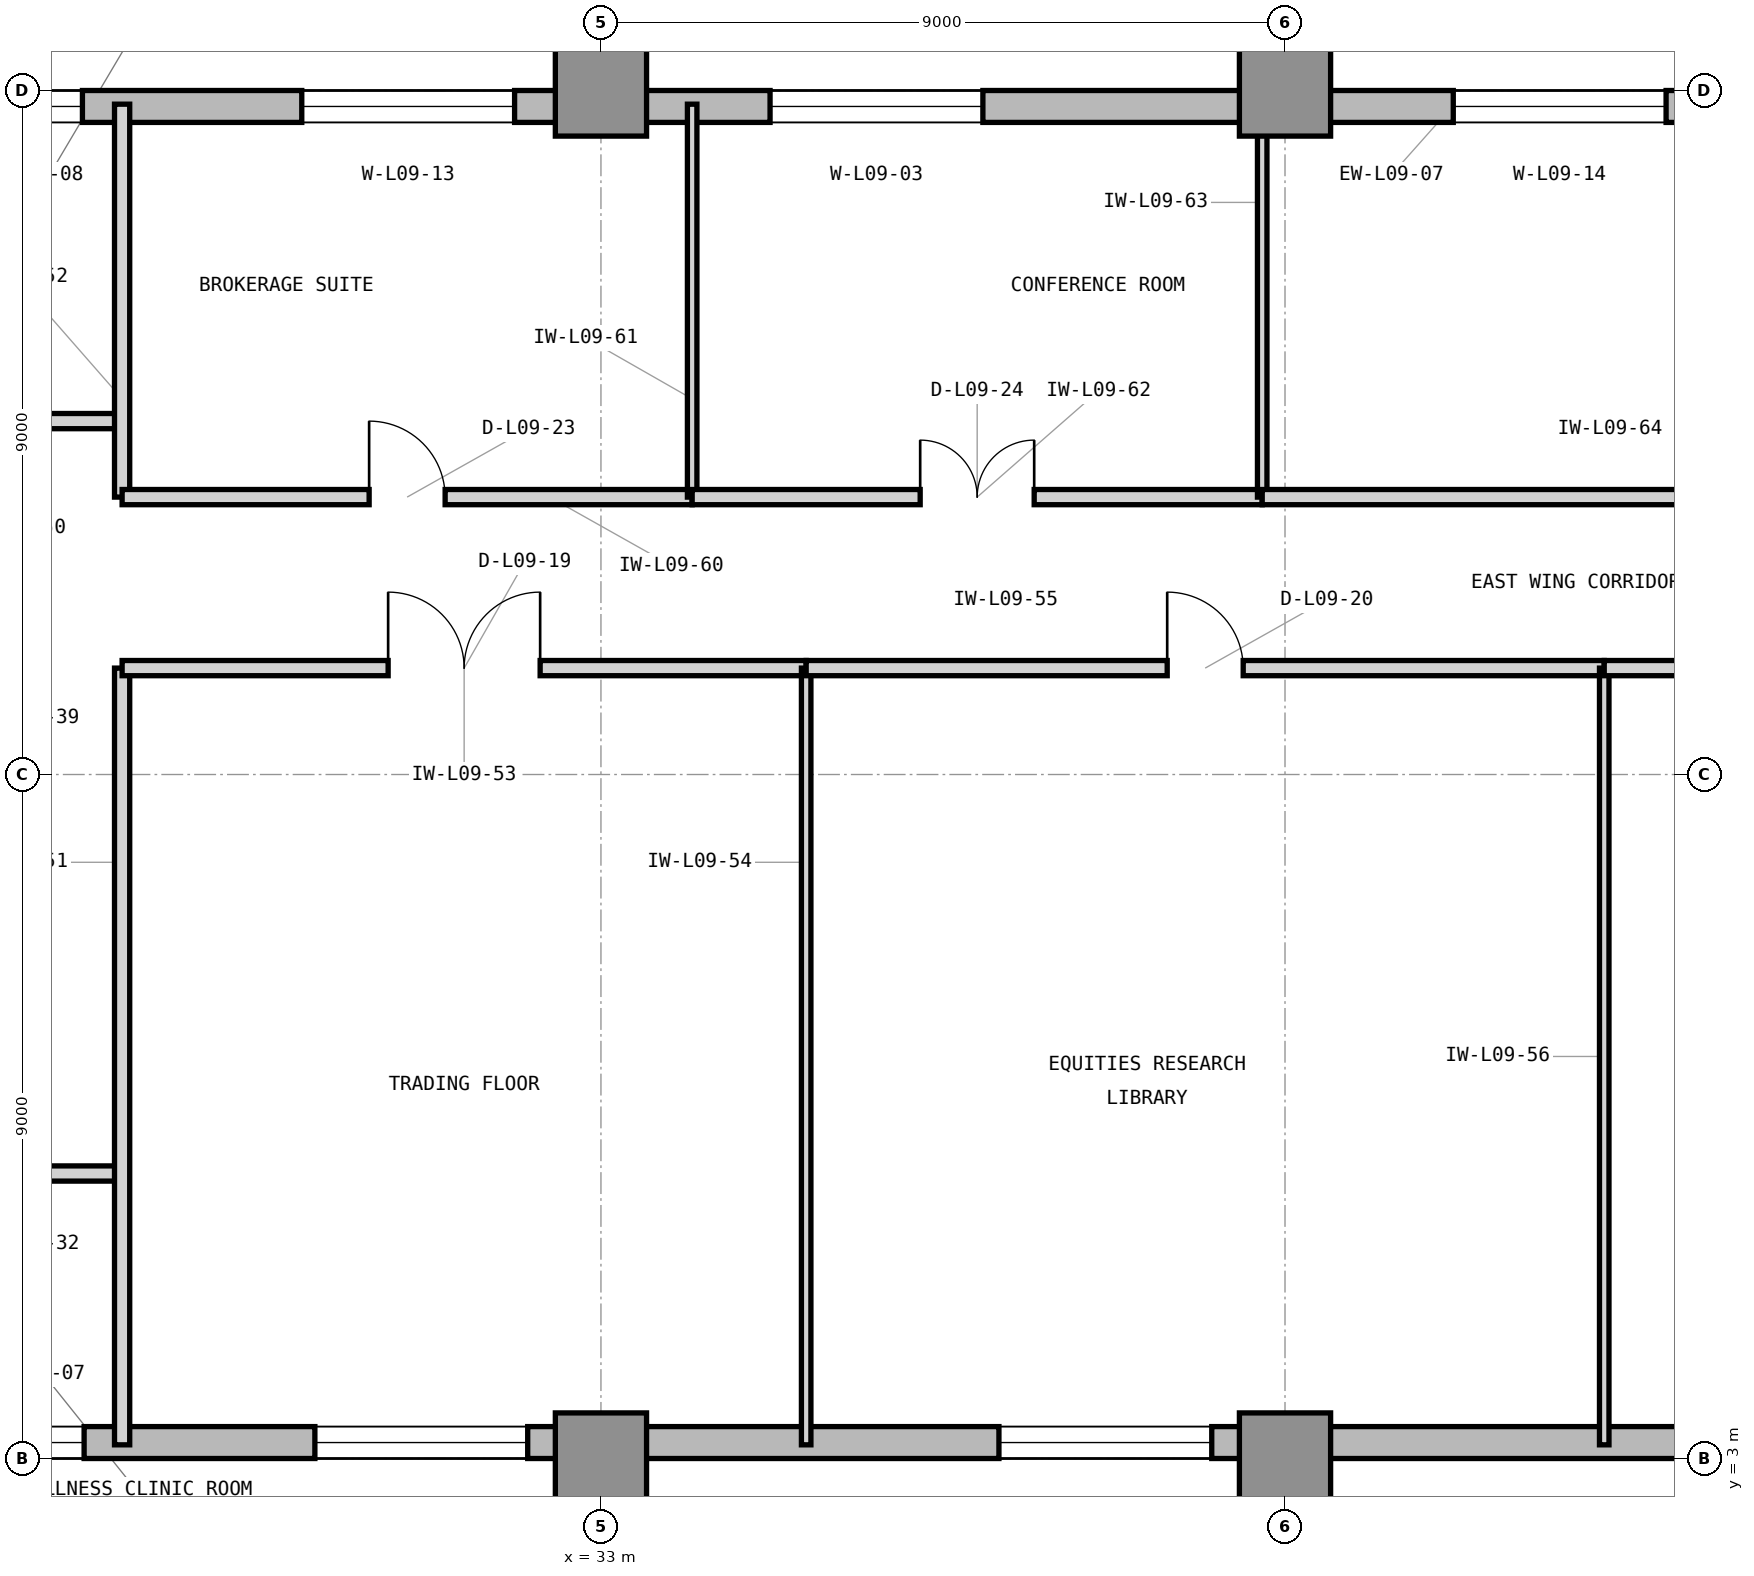
"""IFC4 building model, lengths in metres.
Left out: names, types, materials, properties, quantities, classifications, styles, units other than length and angle.
Written with IfcOpenShell. Run it as: python <this file> out.ifc"""

import sys

from ifc_helpers import new_model, si_unit, direction, frame, frame_2d, origin, origin_2d, place, context, subcontext, project, spatial, rectangle, extrude, element, fill, save


model = new_model("IFC4")
c1 = context("Model", 3, precision=1e-05, world=origin(), true_north=direction((0.0, 1.0)))
c2 = subcontext(c1, "Body", "Model", "MODEL_VIEW")
j1 = project(units=[si_unit("LENGTHUNIT", "METRE"), si_unit("PLANEANGLEUNIT", "RADIAN")], contexts=[c1])
p1 = place(None, origin())
s1 = spatial("IfcSite", under=j1, at=p1, CompositionType="ELEMENT")
p2 = place(p1, origin())
s2 = spatial("IfcBuilding", under=s1, at=p2, CompositionType="ELEMENT")
p3 = place(p2, frame((0.0, 0.0, 42.6)))
s3 = spatial("IfcBuildingStorey", under=s2, at=p3, CompositionType="ELEMENT", Elevation=42.6)
for number, where, z_axis, x_axis in (
    (1, (33.0, 3.0, 0.0), (0.0, 0.0, 1.0), (1.0, 0.0, 0.0)),
    (2, (33.0, 21.0, 0.0), (0.0, 0.0, 1.0), (1.0, 0.0, 0.0)),
    (3, (42.0, 3.0, 0.0), (0.0, 0.0, 1.0), (1.0, 0.0, 0.0)),
    (4, (42.0, 21.0, 0.0), (0.0, 0.0, 1.0), (1.0, 0.0, 0.0)),
):
    element("IfcColumn", number, at=place(p3, frame(where, z_axis=z_axis, x_axis=x_axis)), inside=s3, PredefinedType="COLUMN", context=c2, shape_type="SweptSolid", body=[
        extrude(rectangle(XDim=1.2, YDim=1.2, at=origin_2d()), origin(), (0.0, 0.0, 1.0), 4.2),
    ])
p4 = place(p3, frame((23.9, 3.21, 0.0), z_axis=(0.0, 0.0, 1.0), x_axis=(1.0, 0.0, 0.0)))
e5 = element("IfcWall", 5, at=p4, inside=s3, PredefinedType="STANDARD", context=c2, shape_type="SweptSolid", body=[
    extrude(rectangle(XDim=40.5, YDim=0.42, at=frame_2d((20.25, 0.0))), origin(), (0.0, 0.0, 1.0), 3.98),
])
p5 = place(p4, frame((1.1, 0.0, 0.85)))
e6 = element("IfcOpeningElement", 6, at=p5, cuts=e5, PredefinedType="OPENING", context=c2, shape_type="SweptSolid", body=[
    extrude(rectangle(XDim=1.2, YDim=2.45, at=frame_2d((0.6, 1.225))), frame((0.0, 0.22, 0.0), z_axis=(0.0, -1.0, 0.0), x_axis=(1.0, 0.0, 0.0)), (0.0, 0.0, 1.0), 0.44),
])
p6 = place(p4, frame((5.336, 0.0, 0.85)))
e7 = element("IfcOpeningElement", 7, at=p6, cuts=e5, PredefinedType="OPENING", context=c2, shape_type="SweptSolid", body=[
    extrude(rectangle(XDim=2.8, YDim=2.45, at=frame_2d((1.4, 1.225))), frame((0.0, 0.22, 0.0), z_axis=(0.0, -1.0, 0.0), x_axis=(1.0, 0.0, 0.0)), (0.0, 0.0, 1.0), 0.44),
])
p7 = place(p4, frame((14.336, 0.0, 0.85)))
e8 = element("IfcOpeningElement", 8, at=p7, cuts=e5, PredefinedType="OPENING", context=c2, shape_type="SweptSolid", body=[
    extrude(rectangle(XDim=2.8, YDim=2.45, at=frame_2d((1.4, 1.225))), frame((0.0, 0.22, 0.0), z_axis=(0.0, -1.0, 0.0), x_axis=(1.0, 0.0, 0.0)), (0.0, 0.0, 1.0), 0.44),
])
p8 = place(p4, frame((25.136, 0.0, 0.85)))
e9 = element("IfcOpeningElement", 9, at=p8, cuts=e5, PredefinedType="OPENING", context=c2, shape_type="SweptSolid", body=[
    extrude(rectangle(XDim=1.2, YDim=2.45, at=frame_2d((0.6, 1.225))), frame((0.0, 0.22, 0.0), z_axis=(0.0, -1.0, 0.0), x_axis=(1.0, 0.0, 0.0)), (0.0, 0.0, 1.0), 0.44),
])
p9 = place(p4, frame((34.086, 0.0, 0.85)))
e10 = element("IfcOpeningElement", 10, at=p9, cuts=e5, PredefinedType="OPENING", context=c2, shape_type="SweptSolid", body=[
    extrude(rectangle(XDim=1.2, YDim=2.45, at=frame_2d((0.6, 1.225))), frame((0.0, 0.22, 0.0), z_axis=(0.0, -1.0, 0.0), x_axis=(1.0, 0.0, 0.0)), (0.0, 0.0, 1.0), 0.44),
])
p10 = place(p3, frame((64.4, 20.79, 0.0), z_axis=(0.0, 0.0, 1.0), x_axis=(-1.0, 0.0, 0.0)))
e11 = element("IfcWall", 11, at=p10, inside=s3, PredefinedType="STANDARD", context=c2, shape_type="SweptSolid", body=[
    extrude(rectangle(XDim=40.4, YDim=0.42, at=frame_2d((20.2, 0.0))), origin(), (0.0, 0.0, 1.0), 3.98),
])
p11 = place(p10, frame((26.375, 0.0, 0.85)))
e12 = element("IfcOpeningElement", 12, at=p11, cuts=e11, PredefinedType="OPENING", context=c2, shape_type="SweptSolid", body=[
    extrude(rectangle(XDim=2.8, YDim=2.45, at=frame_2d((1.4, 1.225))), frame((0.0, 0.22, 0.0), z_axis=(0.0, -1.0, 0.0), x_axis=(1.0, 0.0, 0.0)), (0.0, 0.0, 1.0), 0.44),
])
p12 = place(p10, frame((38.222, 0.0, 0.85)))
e13 = element("IfcOpeningElement", 13, at=p12, cuts=e11, PredefinedType="OPENING", context=c2, shape_type="SweptSolid", body=[
    extrude(rectangle(XDim=1.2, YDim=2.45, at=frame_2d((0.6, 1.225))), frame((0.0, 0.22, 0.0), z_axis=(0.0, -1.0, 0.0), x_axis=(1.0, 0.0, 0.0)), (0.0, 0.0, 1.0), 0.44),
])
p13 = place(p10, frame((32.536, 0.0, 0.85)))
e14 = element("IfcOpeningElement", 14, at=p13, cuts=e11, PredefinedType="OPENING", context=c2, shape_type="SweptSolid", body=[
    extrude(rectangle(XDim=2.8, YDim=2.45, at=frame_2d((1.4, 1.225))), frame((0.0, 0.22, 0.0), z_axis=(0.0, -1.0, 0.0), x_axis=(1.0, 0.0, 0.0)), (0.0, 0.0, 1.0), 0.44),
])
p14 = place(p10, frame((17.386, 0.0, 0.85)))
e15 = element("IfcOpeningElement", 15, at=p14, cuts=e11, PredefinedType="OPENING", context=c2, shape_type="SweptSolid", body=[
    extrude(rectangle(XDim=2.8, YDim=2.45, at=frame_2d((1.4, 1.225))), frame((0.0, 0.22, 0.0), z_axis=(0.0, -1.0, 0.0), x_axis=(1.0, 0.0, 0.0)), (0.0, 0.0, 1.0), 0.44),
])
p15 = place(p3, frame((23.85, 6.75, 0.0), z_axis=(0.0, 0.0, 1.0), x_axis=(1.0, 0.0, 0.0)))
e16 = element("IfcWall", 16, at=p15, inside=s3, PredefinedType="PARTITIONING", context=c2, shape_type="SweptSolid", body=[
    extrude(rectangle(XDim=2.85, YDim=0.2, at=frame_2d((1.425, 0.0))), origin(), (0.0, 0.0, 1.0), 3.97),
])
p16 = place(p15, frame((0.7, 0.0, 0.0)))
e17 = element("IfcOpeningElement", 17, at=p16, cuts=e16, PredefinedType="OPENING", context=c2, shape_type="SweptSolid", body=[
    extrude(rectangle(XDim=1.0, YDim=2.15, at=frame_2d((0.5, 1.075))), frame((0.0, 0.11, 0.0), z_axis=(0.0, -1.0, 0.0), x_axis=(1.0, 0.0, 0.0)), (0.0, 0.0, 1.0), 0.22),
])
p17 = place(p3, frame((23.85, 16.65, 0.0), z_axis=(0.0, 0.0, 1.0), x_axis=(1.0, 0.0, 0.0)))
e18 = element("IfcWall", 18, at=p17, inside=s3, PredefinedType="PARTITIONING", context=c2, shape_type="SweptSolid", body=[
    extrude(rectangle(XDim=2.85, YDim=0.2, at=frame_2d((1.425, 0.0))), origin(), (0.0, 0.0, 1.0), 3.97),
])
p18 = place(p17, frame((0.7, 0.0, 0.0)))
e19 = element("IfcOpeningElement", 19, at=p18, cuts=e18, PredefinedType="OPENING", context=c2, shape_type="SweptSolid", body=[
    extrude(rectangle(XDim=1.0, YDim=2.15, at=frame_2d((0.5, 1.075))), frame((0.0, 0.11, 0.0), z_axis=(0.0, -1.0, 0.0), x_axis=(1.0, 0.0, 0.0)), (0.0, 0.0, 1.0), 0.22),
])
p19 = place(p3, frame((26.7, 3.18, 0.0), z_axis=(0.0, 0.0, 1.0), x_axis=(0.0, 1.0, 0.0)))
e20 = element("IfcWall", 20, at=p19, inside=s3, PredefinedType="PARTITIONING", context=c2, shape_type="SweptSolid", body=[
    extrude(rectangle(XDim=10.22, YDim=0.2, at=frame_2d((5.11, 0.0))), origin(), (0.0, 0.0, 1.0), 3.97),
])
p20 = place(p3, frame((26.7, 15.65, 0.0), z_axis=(0.0, 0.0, 1.0), x_axis=(0.0, 1.0, 0.0)))
e21 = element("IfcWall", 21, at=p20, inside=s3, PredefinedType="PARTITIONING", context=c2, shape_type="SweptSolid", body=[
    extrude(rectangle(XDim=5.17, YDim=0.2, at=frame_2d((2.585, 0.0))), origin(), (0.0, 0.0, 1.0), 3.97),
])
p21 = place(p3, frame((26.7, 13.4, 0.0), z_axis=(0.0, 0.0, 1.0), x_axis=(1.0, 0.0, 0.0)))
e22 = element("IfcWall", 22, at=p21, inside=s3, PredefinedType="PARTITIONING", context=c2, shape_type="SweptSolid", body=[
    extrude(rectangle(XDim=9.0, YDim=0.2, at=frame_2d((4.5, 0.0))), origin(), (0.0, 0.0, 1.0), 3.97),
])
p22 = place(p21, frame((3.5, 0.0, 0.0)))
e23 = element("IfcOpeningElement", 23, at=p22, cuts=e22, PredefinedType="OPENING", context=c2, shape_type="SweptSolid", body=[
    extrude(rectangle(XDim=2.0, YDim=2.5, at=frame_2d((1.0, 1.25))), frame((0.0, 0.11, 0.0), z_axis=(0.0, -1.0, 0.0), x_axis=(1.0, 0.0, 0.0)), (0.0, 0.0, 1.0), 0.22),
])
p23 = place(p3, frame((35.7, 3.18, 0.0), z_axis=(0.0, 0.0, 1.0), x_axis=(0.0, 1.0, 0.0)))
e24 = element("IfcWall", 24, at=p23, inside=s3, PredefinedType="PARTITIONING", context=c2, shape_type="SweptSolid", body=[
    extrude(rectangle(XDim=10.22, YDim=0.125, at=frame_2d((5.11, 0.0))), origin(), (0.0, 0.0, 1.0), 3.97),
])
p24 = place(p3, frame((35.7, 13.4, 0.0), z_axis=(0.0, 0.0, 1.0), x_axis=(1.0, 0.0, 0.0)))
e25 = element("IfcWall", 25, at=p24, inside=s3, PredefinedType="PARTITIONING", context=c2, shape_type="SweptSolid", body=[
    extrude(rectangle(XDim=10.5, YDim=0.2, at=frame_2d((5.25, 0.0))), origin(), (0.0, 0.0, 1.0), 3.97),
])
p25 = place(p24, frame((4.75, 0.0, 0.0)))
e26 = element("IfcOpeningElement", 26, at=p25, cuts=e25, PredefinedType="OPENING", context=c2, shape_type="SweptSolid", body=[
    extrude(rectangle(XDim=1.0, YDim=2.15, at=frame_2d((0.5, 1.075))), frame((0.0, 0.11, 0.0), z_axis=(0.0, -1.0, 0.0), x_axis=(1.0, 0.0, 0.0)), (0.0, 0.0, 1.0), 0.22),
])
p26 = place(p3, frame((46.2, 3.18, 0.0), z_axis=(0.0, 0.0, 1.0), x_axis=(0.0, 1.0, 0.0)))
e27 = element("IfcWall", 27, at=p26, inside=s3, PredefinedType="PARTITIONING", context=c2, shape_type="SweptSolid", body=[
    extrude(rectangle(XDim=10.22, YDim=0.125, at=frame_2d((5.11, 0.0))), origin(), (0.0, 0.0, 1.0), 3.97),
])
p27 = place(p3, frame((46.2, 13.4, 0.0), z_axis=(0.0, 0.0, 1.0), x_axis=(1.0, 0.0, 0.0)))
e28 = element("IfcWall", 28, at=p27, inside=s3, PredefinedType="PARTITIONING", context=c2, shape_type="SweptSolid", body=[
    extrude(rectangle(XDim=9.0, YDim=0.2, at=frame_2d((4.5, 0.0))), origin(), (0.0, 0.0, 1.0), 3.97),
])
p28 = place(p27, frame((4.0, 0.0, 0.0)))
e29 = element("IfcOpeningElement", 29, at=p28, cuts=e28, PredefinedType="OPENING", context=c2, shape_type="SweptSolid", body=[
    extrude(rectangle(XDim=1.0, YDim=2.15, at=frame_2d((0.5, 1.075))), frame((0.0, 0.11, 0.0), z_axis=(0.0, -1.0, 0.0), x_axis=(1.0, 0.0, 0.0)), (0.0, 0.0, 1.0), 0.22),
])
p29 = place(p3, frame((26.7, 15.65, 0.0), z_axis=(0.0, 0.0, 1.0), x_axis=(1.0, 0.0, 0.0)))
e30 = element("IfcWall", 30, at=p29, inside=s3, PredefinedType="PARTITIONING", context=c2, shape_type="SweptSolid", body=[
    extrude(rectangle(XDim=7.5, YDim=0.2, at=frame_2d((3.75, 0.0))), origin(), (0.0, 0.0, 1.0), 3.97),
])
p30 = place(p29, frame((3.25, 0.0, 0.0)))
e31 = element("IfcOpeningElement", 31, at=p30, cuts=e30, PredefinedType="OPENING", context=c2, shape_type="SweptSolid", body=[
    extrude(rectangle(XDim=1.0, YDim=2.15, at=frame_2d((0.5, 1.075))), frame((0.0, 0.11, 0.0), z_axis=(0.0, -1.0, 0.0), x_axis=(1.0, 0.0, 0.0)), (0.0, 0.0, 1.0), 0.22),
])
p31 = place(p3, frame((34.2, 15.65, 0.0), z_axis=(0.0, 0.0, 1.0), x_axis=(0.0, 1.0, 0.0)))
e32 = element("IfcWall", 32, at=p31, inside=s3, PredefinedType="PARTITIONING", context=c2, shape_type="SweptSolid", body=[
    extrude(rectangle(XDim=5.17, YDim=0.125, at=frame_2d((2.585, 0.0))), origin(), (0.0, 0.0, 1.0), 3.97),
])
p32 = place(p3, frame((34.2, 15.65, 0.0), z_axis=(0.0, 0.0, 1.0), x_axis=(1.0, 0.0, 0.0)))
e33 = element("IfcWall", 33, at=p32, inside=s3, PredefinedType="PARTITIONING", context=c2, shape_type="SweptSolid", body=[
    extrude(rectangle(XDim=7.5, YDim=0.2, at=frame_2d((3.75, 0.0))), origin(), (0.0, 0.0, 1.0), 3.97),
])
p33 = place(p32, frame((3.0, 0.0, 0.0)))
e34 = element("IfcOpeningElement", 34, at=p33, cuts=e33, PredefinedType="OPENING", context=c2, shape_type="SweptSolid", body=[
    extrude(rectangle(XDim=1.5, YDim=2.3, at=frame_2d((0.75, 1.15))), frame((0.0, 0.11, 0.0), z_axis=(0.0, -1.0, 0.0), x_axis=(1.0, 0.0, 0.0)), (0.0, 0.0, 1.0), 0.22),
])
p34 = place(p3, frame((41.7, 15.65, 0.0), z_axis=(0.0, 0.0, 1.0), x_axis=(0.0, 1.0, 0.0)))
e35 = element("IfcWall", 35, at=p34, inside=s3, PredefinedType="PARTITIONING", context=c2, shape_type="SweptSolid", body=[
    extrude(rectangle(XDim=5.17, YDim=0.125, at=frame_2d((2.585, 0.0))), origin(), (0.0, 0.0, 1.0), 3.97),
])
p35 = place(p3, frame((41.7, 15.65, 0.0), z_axis=(0.0, 0.0, 1.0), x_axis=(1.0, 0.0, 0.0)))
e36 = element("IfcWall", 36, at=p35, inside=s3, PredefinedType="PARTITIONING", context=c2, shape_type="SweptSolid", body=[
    extrude(rectangle(XDim=18.3, YDim=0.2, at=frame_2d((9.15, 0.0))), origin(), (0.0, 0.0, 1.0), 3.97),
])
p36 = place(p35, frame((8.65, 0.0, 0.0)))
e37 = element("IfcOpeningElement", 37, at=p36, cuts=e36, PredefinedType="OPENING", context=c2, shape_type="SweptSolid", body=[
    extrude(rectangle(XDim=1.0, YDim=2.15, at=frame_2d((0.5, 1.075))), frame((0.0, 0.11, 0.0), z_axis=(0.0, -1.0, 0.0), x_axis=(1.0, 0.0, 0.0)), (0.0, 0.0, 1.0), 0.22),
])
p37 = place(p11, origin())
e38 = element("IfcWindow", 38, at=p37, inside=s3, PartitioningType="SINGLE_PANEL", PredefinedType="WINDOW", context=c2, shape_type="SweptSolid", body=[
    extrude(rectangle(XDim=2.8, YDim=2.45, at=frame_2d((1.4, 1.225))), frame((0.0, 0.11, 0.0), z_axis=(0.0, -1.0, 0.0), x_axis=(1.0, 0.0, 0.0)), (0.0, 0.0, 1.0), 0.06),
])
fill(e12, e38)
p38 = place(p22, origin())
e39 = element("IfcDoor", 39, at=p38, inside=s3, OperationType="DOUBLE_DOOR_SINGLE_SWING", PredefinedType="DOOR", context=c2, shape_type="SweptSolid", body=[
    extrude(rectangle(XDim=2.0, YDim=2.5, at=frame_2d((1.0, 1.25))), frame((0.0, 0.025, 0.0), z_axis=(0.0, -1.0, 0.0), x_axis=(1.0, 0.0, 0.0)), (0.0, 0.0, 1.0), 0.05),
])
fill(e23, e39)
p39 = place(p25, origin())
e40 = element("IfcDoor", 40, at=p39, inside=s3, OperationType="SINGLE_SWING_LEFT", PredefinedType="DOOR", context=c2, shape_type="SweptSolid", body=[
    extrude(rectangle(XDim=1.0, YDim=2.15, at=frame_2d((0.5, 1.075))), frame((0.0, 0.025, 0.0), z_axis=(0.0, -1.0, 0.0), x_axis=(1.0, 0.0, 0.0)), (0.0, 0.0, 1.0), 0.05),
])
fill(e26, e40)
p40 = place(p30, origin())
e41 = element("IfcDoor", 41, at=p40, inside=s3, OperationType="SINGLE_SWING_LEFT", PredefinedType="DOOR", context=c2, shape_type="SweptSolid", body=[
    extrude(rectangle(XDim=1.0, YDim=2.15, at=frame_2d((0.5, 1.075))), frame((0.0, 0.025, 0.0), z_axis=(0.0, -1.0, 0.0), x_axis=(1.0, 0.0, 0.0)), (0.0, 0.0, 1.0), 0.05),
])
fill(e31, e41)
p41 = place(p33, origin())
e42 = element("IfcDoor", 42, at=p41, inside=s3, OperationType="DOUBLE_DOOR_SINGLE_SWING", PredefinedType="DOOR", context=c2, shape_type="SweptSolid", body=[
    extrude(rectangle(XDim=1.5, YDim=2.3, at=frame_2d((0.75, 1.15))), frame((0.0, 0.025, 0.0), z_axis=(0.0, -1.0, 0.0), x_axis=(1.0, 0.0, 0.0)), (0.0, 0.0, 1.0), 0.05),
])
fill(e34, e42)
p42 = place(p5, origin())
e43 = element("IfcWindow", 43, at=p42, inside=s3, PartitioningType="SINGLE_PANEL", PredefinedType="WINDOW", context=c2, shape_type="SweptSolid", body=[
    extrude(rectangle(XDim=1.2, YDim=2.45, at=frame_2d((0.6, 1.225))), frame((0.0, 0.11, 0.0), z_axis=(0.0, -1.0, 0.0), x_axis=(1.0, 0.0, 0.0)), (0.0, 0.0, 1.0), 0.06),
])
fill(e6, e43)
p43 = place(p12, origin())
e44 = element("IfcWindow", 44, at=p43, inside=s3, PartitioningType="SINGLE_PANEL", PredefinedType="WINDOW", context=c2, shape_type="SweptSolid", body=[
    extrude(rectangle(XDim=1.2, YDim=2.45, at=frame_2d((0.6, 1.225))), frame((0.0, 0.11, 0.0), z_axis=(0.0, -1.0, 0.0), x_axis=(1.0, 0.0, 0.0)), (0.0, 0.0, 1.0), 0.06),
])
fill(e13, e44)
p44 = place(p6, origin())
e45 = element("IfcWindow", 45, at=p44, inside=s3, PartitioningType="SINGLE_PANEL", PredefinedType="WINDOW", context=c2, shape_type="SweptSolid", body=[
    extrude(rectangle(XDim=2.8, YDim=2.45, at=frame_2d((1.4, 1.225))), frame((0.0, 0.11, 0.0), z_axis=(0.0, -1.0, 0.0), x_axis=(1.0, 0.0, 0.0)), (0.0, 0.0, 1.0), 0.06),
])
fill(e7, e45)
p45 = place(p7, origin())
e46 = element("IfcWindow", 46, at=p45, inside=s3, PartitioningType="SINGLE_PANEL", PredefinedType="WINDOW", context=c2, shape_type="SweptSolid", body=[
    extrude(rectangle(XDim=2.8, YDim=2.45, at=frame_2d((1.4, 1.225))), frame((0.0, 0.11, 0.0), z_axis=(0.0, -1.0, 0.0), x_axis=(1.0, 0.0, 0.0)), (0.0, 0.0, 1.0), 0.06),
])
fill(e8, e46)
p46 = place(p13, origin())
e47 = element("IfcWindow", 47, at=p46, inside=s3, PartitioningType="SINGLE_PANEL", PredefinedType="WINDOW", context=c2, shape_type="SweptSolid", body=[
    extrude(rectangle(XDim=2.8, YDim=2.45, at=frame_2d((1.4, 1.225))), frame((0.0, 0.11, 0.0), z_axis=(0.0, -1.0, 0.0), x_axis=(1.0, 0.0, 0.0)), (0.0, 0.0, 1.0), 0.06),
])
fill(e14, e47)
p47 = place(p14, origin())
e48 = element("IfcWindow", 48, at=p47, inside=s3, PartitioningType="SINGLE_PANEL", PredefinedType="WINDOW", context=c2, shape_type="SweptSolid", body=[
    extrude(rectangle(XDim=2.8, YDim=2.45, at=frame_2d((1.4, 1.225))), frame((0.0, 0.11, 0.0), z_axis=(0.0, -1.0, 0.0), x_axis=(1.0, 0.0, 0.0)), (0.0, 0.0, 1.0), 0.06),
])
fill(e15, e48)
save(model, sys.argv[1])
